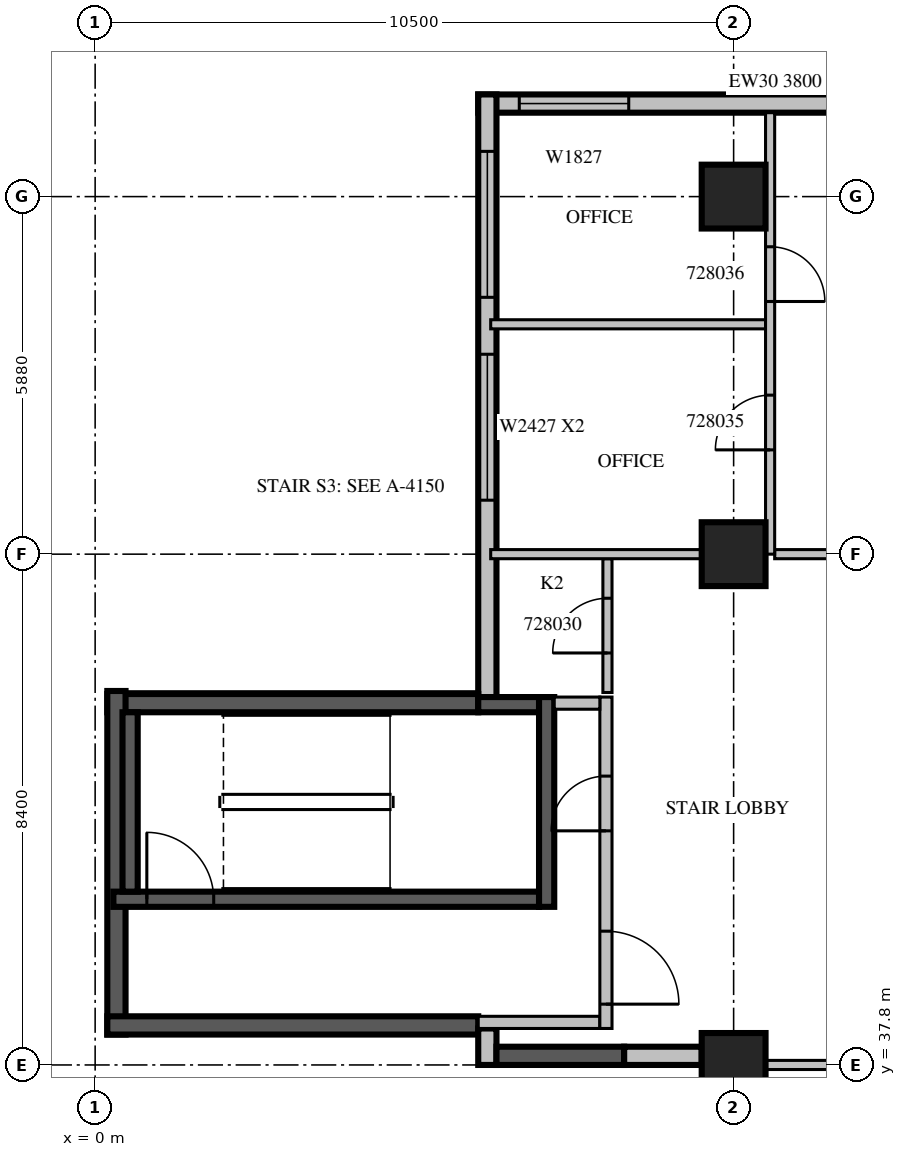
"""IFC4 building model, lengths in metres.
Left out: names, types, materials, properties, quantities, classifications, styles, units other than length and angle.
Written with IfcOpenShell. Run it as: python <this file> out.ifc"""

import sys

from ifc_helpers import new_model, si_unit, direction, frame, frame_2d, origin, origin_2d, place, context, subcontext, project, spatial, rectangle, extrude, source, transform, mapped, element, fill, save


model = new_model("IFC4")
c1 = context("Model", 3, precision=1e-05, world=origin(), true_north=direction((0.0, 1.0)))
c2 = subcontext(c1, "Body", "Model", "MODEL_VIEW")
j1 = project(units=[si_unit("LENGTHUNIT", "METRE"), si_unit("PLANEANGLEUNIT", "RADIAN")], contexts=[c1])
p1 = place(None, origin())
s1 = spatial("IfcSite", under=j1, at=p1, CompositionType="ELEMENT")
p2 = place(p1, origin())
s2 = spatial("IfcBuilding", under=s1, at=p2, CompositionType="ELEMENT")
p3 = place(p2, frame((0.0, 0.0, 128.7)))
s3 = spatial("IfcBuildingStorey", under=s2, at=p3, CompositionType="ELEMENT", Elevation=128.7)
m1 = source(origin(), c2, "Body", "SweptSolid", [
    extrude(rectangle(XDim=1.05, YDim=1.05, at=origin_2d()), origin(), (0.0, 0.0, 1.0), 4.2),
])
for number, where, z_axis, x_axis in (
    (1, (10.5, 37.8, 0.0), (0.0, 0.0, 1.0), (1.0, 0.0, 0.0)),
    (2, (10.5, 46.2, 0.0), (0.0, 0.0, 1.0), (1.0, 0.0, 0.0)),
    (3, (10.5, 52.08, 0.0), (0.0, 0.0, 1.0), (1.0, 0.0, 0.0)),
):
    element("IfcColumn", number, at=place(p3, frame(where, z_axis=z_axis, x_axis=x_axis)), inside=s3, PredefinedType="COLUMN", context=c2, shape_type="MappedRepresentation", body=[
        mapped(m1, transform((0.0, 0.0, 0.0), scale=1.0)),
    ])
m2 = source(origin(), c2, "Body", "SweptSolid", [
    extrude(rectangle(XDim=10.5, YDim=0.3, at=frame_2d((5.25, 0.0))), origin(), (0.0, 0.0, 1.0), 3.8),
])
p4 = place(p3, frame((16.8, 53.61, 0.0), z_axis=(0.0, 0.0, 1.0), x_axis=(-1.0, 0.0, 0.0)))
e4 = element("IfcWall", 4, at=p4, inside=s3, PredefinedType="STANDARD", context=c2, shape_type="MappedRepresentation", body=[
    mapped(m2, transform((0.0, 0.0, 0.0), scale=1.0)),
])
m3 = source(origin(), c2, "Body", "SweptSolid", [
    extrude(rectangle(XDim=1.2, YDim=2.7, at=frame_2d((0.6, 1.35))), frame((0.0, 0.16, 0.0), z_axis=(0.0, -1.0, 0.0), x_axis=(1.0, 0.0, 0.0)), (0.0, 0.0, 1.0), 0.32),
])
p5 = place(p4, frame((2.15, 0.0, 0.6)))
e5 = element("IfcOpeningElement", 5, at=p5, cuts=e4, PredefinedType="OPENING", context=c2, shape_type="MappedRepresentation", body=[
    mapped(m3, transform((0.0, 0.0, 0.0), scale=1.0)),
])
m4 = source(origin(), c2, "Body", "SweptSolid", [
    extrude(rectangle(XDim=1.8, YDim=2.7, at=frame_2d((0.9, 1.35))), frame((0.0, 0.16, 0.0), z_axis=(0.0, -1.0, 0.0), x_axis=(1.0, 0.0, 0.0)), (0.0, 0.0, 1.0), 0.32),
])
p6 = place(p4, frame((8.025, 0.0, 0.6)))
e6 = element("IfcOpeningElement", 6, at=p6, cuts=e4, PredefinedType="OPENING", context=c2, shape_type="MappedRepresentation", body=[
    mapped(m4, transform((0.0, 0.0, 0.0), scale=1.0)),
])
m5 = source(origin(), c2, "Body", "SweptSolid", [
    extrude(rectangle(XDim=9.91, YDim=0.3, at=frame_2d((4.955, 0.0))), origin(), (0.0, 0.0, 1.0), 3.8),
])
p7 = place(p3, frame((6.45, 53.76, 0.0), z_axis=(0.0, 0.0, 1.0), x_axis=(0.0, -1.0, 0.0)))
e7 = element("IfcWall", 7, at=p7, inside=s3, PredefinedType="STANDARD", context=c2, shape_type="MappedRepresentation", body=[
    mapped(m5, transform((0.0, 0.0, 0.0), scale=1.0)),
])
m6 = source(origin(), c2, "Body", "SweptSolid", [
    extrude(rectangle(XDim=2.4, YDim=2.7, at=frame_2d((1.2, 1.35))), frame((0.0, 0.16, 0.0), z_axis=(0.0, -1.0, 0.0), x_axis=(1.0, 0.0, 0.0)), (0.0, 0.0, 1.0), 0.32),
])
p8 = place(p7, frame((4.272, 0.0, 0.6)))
e8 = element("IfcOpeningElement", 8, at=p8, cuts=e7, PredefinedType="OPENING", context=c2, shape_type="MappedRepresentation", body=[
    mapped(m6, transform((0.0, 0.0, 0.0), scale=1.0)),
])
p9 = place(p7, frame((0.936, 0.0, 0.6)))
e9 = element("IfcOpeningElement", 9, at=p9, cuts=e7, PredefinedType="OPENING", context=c2, shape_type="MappedRepresentation", body=[
    mapped(m6, transform((0.0, 0.0, 0.0), scale=1.0)),
])
m7 = source(origin(), c2, "Body", "SweptSolid", [
    extrude(rectangle(XDim=6.1, YDim=0.3, at=frame_2d((3.05, 0.0))), origin(), (0.0, 0.0, 1.0), 3.8),
])
p10 = place(p3, frame((6.3, 43.75, 0.0), z_axis=(0.0, 0.0, 1.0), x_axis=(-1.0, 0.0, 0.0)))
e10 = element("IfcWall", 10, at=p10, inside=s3, PredefinedType="SOLIDWALL", context=c2, shape_type="MappedRepresentation", body=[
    mapped(m7, transform((0.0, 0.0, 0.0), scale=1.0)),
])
m8 = source(origin(), c2, "Body", "SweptSolid", [
    extrude(rectangle(XDim=5.65, YDim=0.3, at=frame_2d((2.825, 0.0))), origin(), (0.0, 0.0, 1.0), 3.8),
])
p11 = place(p3, frame((0.35, 43.95, 0.0), z_axis=(0.0, 0.0, 1.0), x_axis=(0.0, -1.0, 0.0)))
e11 = element("IfcWall", 11, at=p11, inside=s3, PredefinedType="SOLIDWALL", context=c2, shape_type="MappedRepresentation", body=[
    mapped(m8, transform((0.0, 0.0, 0.0), scale=1.0)),
])
p12 = place(p3, frame((0.2, 38.45, 0.0), z_axis=(0.0, 0.0, 1.0), x_axis=(1.0, 0.0, 0.0)))
e12 = element("IfcWall", 12, at=p12, inside=s3, PredefinedType="SOLIDWALL", context=c2, shape_type="MappedRepresentation", body=[
    mapped(m7, transform((0.0, 0.0, 0.0), scale=1.0)),
])
m9 = source(origin(), c2, "Body", "SweptSolid", [
    extrude(rectangle(XDim=0.6, YDim=0.3, at=frame_2d((0.3, 0.0))), origin(), (0.0, 0.0, 1.0), 3.8),
])
p13 = place(p3, frame((6.45, 38.4, 0.0), z_axis=(0.0, 0.0, 1.0), x_axis=(0.0, -1.0, 0.0)))
e13 = element("IfcWall", 13, at=p13, inside=s3, PredefinedType="STANDARD", context=c2, shape_type="MappedRepresentation", body=[
    mapped(m9, transform((0.0, 0.0, 0.0), scale=1.0)),
])
m10 = source(origin(), c2, "Body", "SweptSolid", [
    extrude(rectangle(XDim=2.1, YDim=0.3, at=frame_2d((1.05, 0.0))), origin(), (0.0, 0.0, 1.0), 3.8),
])
p14 = place(p3, frame((6.6, 37.95, 0.0), z_axis=(0.0, 0.0, 1.0), x_axis=(1.0, 0.0, 0.0)))
e14 = element("IfcWall", 14, at=p14, inside=s3, PredefinedType="SOLIDWALL", context=c2, shape_type="MappedRepresentation", body=[
    mapped(m10, transform((0.0, 0.0, 0.0), scale=1.0)),
])
m11 = source(origin(), c2, "Body", "SweptSolid", [
    extrude(rectangle(XDim=1.275, YDim=0.3, at=frame_2d((0.637, 0.0))), origin(), (0.0, 0.0, 1.0), 3.8),
])
p15 = place(p3, frame((8.7, 37.95, 0.0), z_axis=(0.0, 0.0, 1.0), x_axis=(1.0, 0.0, 0.0)))
e15 = element("IfcWall", 15, at=p15, inside=s3, PredefinedType="STANDARD", context=c2, shape_type="MappedRepresentation", body=[
    mapped(m11, transform((0.0, 0.0, 0.0), scale=1.0)),
])
m12 = source(origin(), c2, "Body", "SweptSolid", [
    extrude(rectangle(XDim=7.0, YDim=0.25, at=frame_2d((3.5, 0.0))), origin(), (0.0, 0.0, 1.0), 3.8),
])
p16 = place(p3, frame((0.3, 40.525, 0.0), z_axis=(0.0, 0.0, 1.0), x_axis=(1.0, 0.0, 0.0)))
e16 = element("IfcWall", 16, at=p16, inside=s3, PredefinedType="SOLIDWALL", context=c2, shape_type="MappedRepresentation", body=[
    mapped(m12, transform((0.0, 0.0, 0.0), scale=1.0)),
])
m13 = source(origin(), c2, "Body", "SweptSolid", [
    extrude(rectangle(XDim=1.1, YDim=2.1, at=frame_2d((0.55, 1.05))), frame((0.0, 0.135, 0.0), z_axis=(0.0, -1.0, 0.0), x_axis=(1.0, 0.0, 0.0)), (0.0, 0.0, 1.0), 0.27),
])
p17 = place(p16, frame((0.55, 0.0, 0.0)))
e17 = element("IfcOpeningElement", 17, at=p17, cuts=e16, PredefinedType="OPENING", context=c2, shape_type="MappedRepresentation", body=[
    mapped(m13, transform((0.0, 0.0, 0.0), scale=1.0)),
])
m14 = source(origin(), c2, "Body", "SweptSolid", [
    extrude(rectangle(XDim=1.0, YDim=0.25, at=frame_2d((0.5, 0.0))), origin(), (0.0, 0.0, 1.0), 3.8),
])
p18 = place(p3, frame((6.3, 43.725, 0.0), z_axis=(0.0, 0.0, 1.0), x_axis=(1.0, 0.0, 0.0)))
e18 = element("IfcWall", 18, at=p18, inside=s3, PredefinedType="SOLIDWALL", context=c2, shape_type="MappedRepresentation", body=[
    mapped(m14, transform((0.0, 0.0, 0.0), scale=1.0)),
])
m15 = source(origin(), c2, "Body", "SweptSolid", [
    extrude(rectangle(XDim=3.45, YDim=0.25, at=frame_2d((1.725, 0.0))), origin(), (0.0, 0.0, 1.0), 3.8),
])
p19 = place(p3, frame((7.425, 40.4, 0.0), z_axis=(0.0, 0.0, 1.0), x_axis=(0.0, 1.0, 0.0)))
e19 = element("IfcWall", 19, at=p19, inside=s3, PredefinedType="SOLIDWALL", context=c2, shape_type="MappedRepresentation", body=[
    mapped(m15, transform((0.0, 0.0, 0.0), scale=1.0)),
])
m16 = source(origin(), c2, "Body", "SweptSolid", [
    extrude(rectangle(XDim=2.95, YDim=0.25, at=frame_2d((1.475, 0.0))), origin(), (0.0, 0.0, 1.0), 3.8),
])
p20 = place(p3, frame((0.575, 40.65, 0.0), z_axis=(0.0, 0.0, 1.0), x_axis=(0.0, 1.0, 0.0)))
e20 = element("IfcWall", 20, at=p20, inside=s3, PredefinedType="SOLIDWALL", context=c2, shape_type="MappedRepresentation", body=[
    mapped(m16, transform((0.0, 0.0, 0.0), scale=1.0)),
])
m17 = source(origin(), c2, "Body", "SweptSolid", [
    extrude(rectangle(XDim=2.0, YDim=0.2, at=frame_2d((1.0, 0.0))), origin(), (0.0, 0.0, 1.0), 3.8),
])
p21 = place(p3, frame((6.3, 38.5, 0.0), z_axis=(0.0, 0.0, 1.0), x_axis=(1.0, 0.0, 0.0)))
e21 = element("IfcWall", 21, at=p21, inside=s3, PredefinedType="PARTITIONING", context=c2, shape_type="MappedRepresentation", body=[
    mapped(m17, transform((0.0, 0.0, 0.0), scale=1.0)),
])
m18 = source(origin(), c2, "Body", "SweptSolid", [
    extrude(rectangle(XDim=5.45, YDim=0.2, at=frame_2d((2.725, 0.0))), origin(), (0.0, 0.0, 1.0), 3.8),
])
p22 = place(p3, frame((8.4, 38.4, 0.0), z_axis=(0.0, 0.0, 1.0), x_axis=(0.0, 1.0, 0.0)))
e22 = element("IfcWall", 22, at=p22, inside=s3, PredefinedType="PARTITIONING", context=c2, shape_type="MappedRepresentation", body=[
    mapped(m18, transform((0.0, 0.0, 0.0), scale=1.0)),
])
m19 = source(origin(), c2, "Body", "SweptSolid", [
    extrude(rectangle(XDim=1.2, YDim=2.1, at=frame_2d((0.6, 1.05))), frame((0.0, 0.11, 0.0), z_axis=(0.0, -1.0, 0.0), x_axis=(1.0, 0.0, 0.0)), (0.0, 0.0, 1.0), 0.22),
])
p23 = place(p22, frame((0.4, 0.0, 0.0)))
e23 = element("IfcOpeningElement", 23, at=p23, cuts=e22, PredefinedType="OPENING", context=c2, shape_type="MappedRepresentation", body=[
    mapped(m19, transform((0.0, 0.0, 0.0), scale=1.0)),
])
m20 = source(origin(), c2, "Body", "SweptSolid", [
    extrude(rectangle(XDim=0.9, YDim=2.1, at=frame_2d((0.45, 1.05))), frame((0.0, 0.11, 0.0), z_axis=(0.0, -1.0, 0.0), x_axis=(1.0, 0.0, 0.0)), (0.0, 0.0, 1.0), 0.22),
])
p24 = place(p22, frame((3.25, 0.0, 0.0)))
e24 = element("IfcOpeningElement", 24, at=p24, cuts=e22, PredefinedType="OPENING", context=c2, shape_type="MappedRepresentation", body=[
    mapped(m20, transform((0.0, 0.0, 0.0), scale=1.0)),
])
m21 = source(origin(), c2, "Body", "SweptSolid", [
    extrude(rectangle(XDim=0.75, YDim=0.2, at=frame_2d((0.375, 0.0))), origin(), (0.0, 0.0, 1.0), 3.8),
])
p25 = place(p3, frame((7.55, 43.75, 0.0), z_axis=(0.0, 0.0, 1.0), x_axis=(1.0, 0.0, 0.0)))
e25 = element("IfcWall", 25, at=p25, inside=s3, PredefinedType="PARTITIONING", context=c2, shape_type="MappedRepresentation", body=[
    mapped(m21, transform((0.0, 0.0, 0.0), scale=1.0)),
])
m22 = source(origin(), c2, "Body", "SweptSolid", [
    extrude(rectangle(XDim=2.2, YDim=0.15, at=frame_2d((1.1, 0.0))), origin(), (0.0, 0.0, 1.0), 3.8),
])
p26 = place(p3, frame((8.425, 43.925, 0.0), z_axis=(0.0, 0.0, 1.0), x_axis=(0.0, 1.0, 0.0)))
e26 = element("IfcWall", 26, at=p26, inside=s3, PredefinedType="PARTITIONING", context=c2, shape_type="MappedRepresentation", body=[
    mapped(m22, transform((0.0, 0.0, 0.0), scale=1.0)),
])
m23 = source(origin(), c2, "Body", "SweptSolid", [
    extrude(rectangle(XDim=0.9, YDim=2.1, at=frame_2d((0.45, 1.05))), frame((0.0, 0.085, 0.0), z_axis=(0.0, -1.0, 0.0), x_axis=(1.0, 0.0, 0.0)), (0.0, 0.0, 1.0), 0.17),
])
p27 = place(p26, frame((0.65, 0.0, 0.0)))
e27 = element("IfcOpeningElement", 27, at=p27, cuts=e26, PredefinedType="OPENING", context=c2, shape_type="MappedRepresentation", body=[
    mapped(m23, transform((0.0, 0.0, 0.0), scale=1.0)),
])
m24 = source(origin(), c2, "Body", "SweptSolid", [
    extrude(rectangle(XDim=3.976, YDim=0.15, at=frame_2d((1.988, 0.0))), origin(), (0.0, 0.0, 1.0), 3.8),
])
p28 = place(p3, frame((15.0, 37.8, 0.0), z_axis=(0.0, 0.0, 1.0), x_axis=(-1.0, 0.0, 0.0)))
e28 = element("IfcWall", 28, at=p28, inside=s3, PredefinedType="PARTITIONING", context=c2, shape_type="MappedRepresentation", body=[
    mapped(m24, transform((0.0, 0.0, 0.0), scale=1.0)),
])
m25 = source(origin(), c2, "Body", "SweptSolid", [
    extrude(rectangle(XDim=4.52, YDim=0.15, at=frame_2d((2.26, 0.0))), origin(), (0.0, 0.0, 1.0), 3.8),
])
p29 = place(p3, frame((11.025, 49.98, 0.0), z_axis=(0.0, 0.0, 1.0), x_axis=(-1.0, 0.0, 0.0)))
e29 = element("IfcWall", 29, at=p29, inside=s3, PredefinedType="PARTITIONING", context=c2, shape_type="MappedRepresentation", body=[
    mapped(m25, transform((0.0, 0.0, 0.0), scale=1.0)),
])
m26 = source(origin(), c2, "Body", "SweptSolid", [
    extrude(rectangle(XDim=3.471, YDim=0.15, at=frame_2d((1.736, 0.0))), origin(), (0.0, 0.0, 1.0), 3.8),
])
p30 = place(p3, frame((9.976, 46.2, 0.0), z_axis=(0.0, 0.0, 1.0), x_axis=(-1.0, 0.0, 0.0)))
e30 = element("IfcWall", 30, at=p30, inside=s3, PredefinedType="PARTITIONING", context=c2, shape_type="MappedRepresentation", body=[
    mapped(m26, transform((0.0, 0.0, 0.0), scale=1.0)),
])
m27 = source(origin(), c2, "Body", "SweptSolid", [
    extrude(rectangle(XDim=3.825, YDim=0.15, at=frame_2d((1.913, 0.0))), origin(), (0.0, 0.0, 1.0), 3.8),
])
p31 = place(p3, frame((15.0, 46.2, 0.0), z_axis=(0.0, 0.0, 1.0), x_axis=(-1.0, 0.0, 0.0)))
e31 = element("IfcWall", 31, at=p31, inside=s3, PredefinedType="PARTITIONING", context=c2, shape_type="MappedRepresentation", body=[
    mapped(m27, transform((0.0, 0.0, 0.0), scale=1.0)),
])
m28 = source(origin(), c2, "Body", "SweptSolid", [
    extrude(rectangle(XDim=7.26, YDim=0.15, at=frame_2d((3.63, 0.0))), origin(), (0.0, 0.0, 1.0), 3.8),
])
p32 = place(p3, frame((11.1, 46.2, 0.0), z_axis=(0.0, 0.0, 1.0), x_axis=(0.0, 1.0, 0.0)))
e32 = element("IfcWall", 32, at=p32, inside=s3, PredefinedType="PARTITIONING", context=c2, shape_type="MappedRepresentation", body=[
    mapped(m28, transform((0.0, 0.0, 0.0), scale=1.0)),
])
p33 = place(p32, frame((1.715, 0.0, 0.0)))
e33 = element("IfcOpeningElement", 33, at=p33, cuts=e32, PredefinedType="OPENING", context=c2, shape_type="MappedRepresentation", body=[
    mapped(m23, transform((0.0, 0.0, 0.0), scale=1.0)),
])
p34 = place(p32, frame((4.155, 0.0, 0.0)))
e34 = element("IfcOpeningElement", 34, at=p34, cuts=e32, PredefinedType="OPENING", context=c2, shape_type="MappedRepresentation", body=[
    mapped(m23, transform((0.0, 0.0, 0.0), scale=1.0)),
])
m29 = source(origin(), c2, "Body", "SweptSolid", [
    extrude(rectangle(XDim=1.8, YDim=2.7, at=frame_2d((0.9, 1.35))), frame((0.0, 0.03, 0.0), z_axis=(0.0, -1.0, 0.0), x_axis=(1.0, 0.0, 0.0)), (0.0, 0.0, 1.0), 0.06),
])
p35 = place(p6, origin())
e35 = element("IfcWindow", 35, at=p35, inside=s3, PartitioningType="SINGLE_PANEL", PredefinedType="WINDOW", context=c2, shape_type="MappedRepresentation", body=[
    mapped(m29, transform((0.0, 0.0, 0.0), scale=1.0)),
])
fill(e6, e35)
m30 = source(origin(), c2, "Body", "SweptSolid", [
    extrude(rectangle(XDim=2.4, YDim=2.7, at=frame_2d((1.2, 1.35))), frame((0.0, 0.03, 0.0), z_axis=(0.0, -1.0, 0.0), x_axis=(1.0, 0.0, 0.0)), (0.0, 0.0, 1.0), 0.06),
])
p36 = place(p8, origin())
e36 = element("IfcWindow", 36, at=p36, inside=s3, PartitioningType="SINGLE_PANEL", PredefinedType="WINDOW", context=c2, shape_type="MappedRepresentation", body=[
    mapped(m30, transform((0.0, 0.0, 0.0), scale=1.0)),
])
fill(e8, e36)
p37 = place(p9, origin())
e37 = element("IfcWindow", 37, at=p37, inside=s3, PartitioningType="SINGLE_PANEL", PredefinedType="WINDOW", context=c2, shape_type="MappedRepresentation", body=[
    mapped(m30, transform((0.0, 0.0, 0.0), scale=1.0)),
])
fill(e9, e37)
m31 = source(origin(), c2, "Body", "SweptSolid", [
    extrude(rectangle(XDim=1.1, YDim=2.1, at=frame_2d((0.55, 1.05))), frame((0.0, 0.025, 0.0), z_axis=(0.0, -1.0, 0.0), x_axis=(1.0, 0.0, 0.0)), (0.0, 0.0, 1.0), 0.05),
])
p38 = place(p17, origin())
e38 = element("IfcDoor", 38, at=p38, inside=s3, OperationType="SINGLE_SWING_LEFT", PredefinedType="DOOR", context=c2, shape_type="MappedRepresentation", body=[
    mapped(m31, transform((0.0, 0.0, 0.0), scale=1.0)),
])
fill(e17, e38)
m32 = source(origin(), c2, "Body", "SweptSolid", [
    extrude(rectangle(XDim=1.2, YDim=2.1, at=frame_2d((0.6, 1.05))), frame((0.0, 0.025, 0.0), z_axis=(0.0, -1.0, 0.0), x_axis=(1.0, 0.0, 0.0)), (0.0, 0.0, 1.0), 0.05),
])
p39 = place(p23, origin())
e39 = element("IfcDoor", 39, at=p39, inside=s3, OperationType="SINGLE_SWING_RIGHT", PredefinedType="DOOR", context=c2, shape_type="MappedRepresentation", body=[
    mapped(m32, transform((0.0, 0.0, 0.0), scale=1.0)),
])
fill(e23, e39)
m33 = source(origin(), c2, "Body", "SweptSolid", [
    extrude(rectangle(XDim=0.9, YDim=2.1, at=frame_2d((0.45, 1.05))), frame((0.0, 0.025, 0.0), z_axis=(0.0, -1.0, 0.0), x_axis=(1.0, 0.0, 0.0)), (0.0, 0.0, 1.0), 0.05),
])
p40 = place(p24, origin())
e40 = element("IfcDoor", 40, at=p40, inside=s3, OperationType="SINGLE_SWING_LEFT", PredefinedType="DOOR", context=c2, shape_type="MappedRepresentation", body=[
    mapped(m33, transform((0.0, 0.0, 0.0), scale=1.0)),
])
fill(e24, e40)
p41 = place(p27, origin())
e41 = element("IfcDoor", 41, at=p41, inside=s3, OperationType="SINGLE_SWING_LEFT", PredefinedType="DOOR", context=c2, shape_type="MappedRepresentation", body=[
    mapped(m33, transform((0.0, 0.0, 0.0), scale=1.0)),
])
fill(e27, e41)
p42 = place(p33, origin())
e42 = element("IfcDoor", 42, at=p42, inside=s3, OperationType="SINGLE_SWING_LEFT", PredefinedType="DOOR", context=c2, shape_type="MappedRepresentation", body=[
    mapped(m33, transform((0.0, 0.0, 0.0), scale=1.0)),
])
fill(e33, e42)
p43 = place(p34, origin())
e43 = element("IfcDoor", 43, at=p43, inside=s3, OperationType="SINGLE_SWING_RIGHT", PredefinedType="DOOR", context=c2, shape_type="MappedRepresentation", body=[
    mapped(m33, transform((0.0, 0.0, 0.0), scale=1.0)),
])
fill(e34, e43)
save(model, sys.argv[1])
